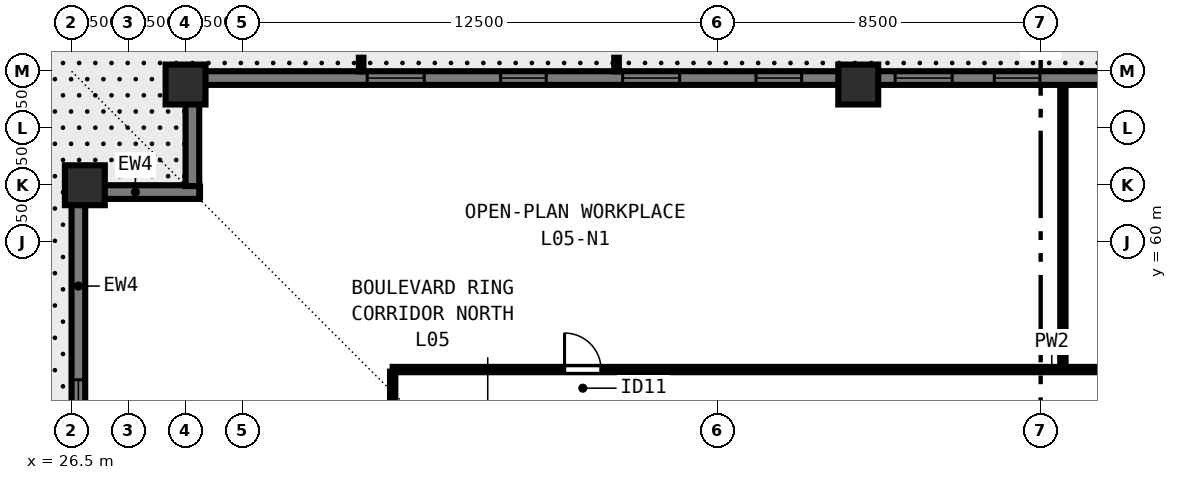
"""IFC4 building model, lengths in metres.
Left out: names, types, materials, properties, quantities, classifications, styles, units other than length and angle.
Written with IfcOpenShell. Run it as: python <this file> out.ifc"""

import sys

from ifc_helpers import new_model, si_unit, direction, frame, frame_2d, origin, origin_2d, place, context, subcontext, project, spatial, rectangle, extrude, element, fill, save


model = new_model("IFC4")
c1 = context("Model", 3, precision=1e-05, world=origin(), true_north=direction((0.0, 1.0)))
c2 = subcontext(c1, "Body", "Model", "MODEL_VIEW")
j1 = project(units=[si_unit("LENGTHUNIT", "METRE"), si_unit("PLANEANGLEUNIT", "RADIAN")], contexts=[c1])
p1 = place(None, origin())
s1 = spatial("IfcSite", under=j1, at=p1, CompositionType="ELEMENT")
p2 = place(p1, origin())
s2 = spatial("IfcBuilding", under=s1, at=p2, CompositionType="ELEMENT")
p3 = place(p2, frame((0.0, 0.0, 23.5)))
s3 = spatial("IfcBuildingStorey", under=s2, at=p3, CompositionType="ELEMENT", Elevation=23.5)
for number, where, z_axis, x_axis in (
    (1, (47.2, 64.15, 0.0), (0.0, 0.0, 1.0), (1.0, 0.0, 0.0)),
    (2, (29.5, 64.15, 0.0), (0.0, 0.0, 1.0), (1.0, 0.0, 0.0)),
    (3, (26.85, 61.5, 0.0), (0.0, 0.0, 1.0), (0.0, 1.0, 0.0)),
):
    element("IfcColumn", number, at=place(p3, frame(where, z_axis=z_axis, x_axis=x_axis)), inside=s3, PredefinedType="COLUMN", context=c2, shape_type="SweptSolid", body=[
        extrude(rectangle(XDim=1.05, YDim=1.05, at=origin_2d()), origin(), (0.0, 0.0, 1.0), 3.5),
    ])
p4 = place(p3, frame((26.68, 16.5, 0.0), z_axis=(0.0, 0.0, 1.0), x_axis=(0.0, 1.0, 0.0)))
e4 = element("IfcWall", 4, at=p4, inside=s3, PredefinedType="SOLIDWALL", context=c2, shape_type="SweptSolid", body=[
    extrude(rectangle(XDim=44.662, YDim=0.36, at=frame_2d((22.331, 0.0))), origin(), (0.0, 0.0, 1.0), 3.28),
])
p5 = place(p4, frame((4.78, 0.0, 0.8)))
e5 = element("IfcOpeningElement", 5, at=p5, cuts=e4, PredefinedType="OPENING", context=c2, shape_type="SweptSolid", body=[
    extrude(rectangle(XDim=1.5, YDim=1.544, at=frame_2d((0.75, 0.772))), frame((0.0, 0.19, 0.0), z_axis=(0.0, -1.0, 0.0), x_axis=(1.0, 0.0, 0.0)), (0.0, 0.0, 1.0), 0.38),
])
p6 = place(p4, frame((8.29, 0.0, 0.8)))
e6 = element("IfcOpeningElement", 6, at=p6, cuts=e4, PredefinedType="OPENING", context=c2, shape_type="SweptSolid", body=[
    extrude(rectangle(XDim=1.2, YDim=1.544, at=frame_2d((0.6, 0.772))), frame((0.0, 0.19, 0.0), z_axis=(0.0, -1.0, 0.0), x_axis=(1.0, 0.0, 0.0)), (0.0, 0.0, 1.0), 0.38),
])
p7 = place(p4, frame((11.5, 0.0, 0.8)))
e7 = element("IfcOpeningElement", 7, at=p7, cuts=e4, PredefinedType="OPENING", context=c2, shape_type="SweptSolid", body=[
    extrude(rectangle(XDim=1.5, YDim=1.544, at=frame_2d((0.75, 0.772))), frame((0.0, 0.19, 0.0), z_axis=(0.0, -1.0, 0.0), x_axis=(1.0, 0.0, 0.0)), (0.0, 0.0, 1.0), 0.38),
])
p8 = place(p4, frame((14.561, 0.0, 0.8)))
e8 = element("IfcOpeningElement", 8, at=p8, cuts=e4, PredefinedType="OPENING", context=c2, shape_type="SweptSolid", body=[
    extrude(rectangle(XDim=1.2, YDim=1.544, at=frame_2d((0.6, 0.772))), frame((0.0, 0.19, 0.0), z_axis=(0.0, -1.0, 0.0), x_axis=(1.0, 0.0, 0.0)), (0.0, 0.0, 1.0), 0.38),
])
p9 = place(p4, frame((18.671, 0.0, 0.8)))
e9 = element("IfcOpeningElement", 9, at=p9, cuts=e4, PredefinedType="OPENING", context=c2, shape_type="SweptSolid", body=[
    extrude(rectangle(XDim=1.5, YDim=1.544, at=frame_2d((0.75, 0.772))), frame((0.0, 0.19, 0.0), z_axis=(0.0, -1.0, 0.0), x_axis=(1.0, 0.0, 0.0)), (0.0, 0.0, 1.0), 0.38),
])
p10 = place(p4, frame((21.731, 0.0, 0.8)))
e10 = element("IfcOpeningElement", 10, at=p10, cuts=e4, PredefinedType="OPENING", context=c2, shape_type="SweptSolid", body=[
    extrude(rectangle(XDim=1.2, YDim=1.544, at=frame_2d((0.6, 0.772))), frame((0.0, 0.19, 0.0), z_axis=(0.0, -1.0, 0.0), x_axis=(1.0, 0.0, 0.0)), (0.0, 0.0, 1.0), 0.38),
])
p11 = place(p4, frame((24.941, 0.0, 0.8)))
e11 = element("IfcOpeningElement", 11, at=p11, cuts=e4, PredefinedType="OPENING", context=c2, shape_type="SweptSolid", body=[
    extrude(rectangle(XDim=1.5, YDim=1.544, at=frame_2d((0.75, 0.772))), frame((0.0, 0.19, 0.0), z_axis=(0.0, -1.0, 0.0), x_axis=(1.0, 0.0, 0.0)), (0.0, 0.0, 1.0), 0.38),
])
p12 = place(p4, frame((29.302, 0.0, 0.8)))
e12 = element("IfcOpeningElement", 12, at=p12, cuts=e4, PredefinedType="OPENING", context=c2, shape_type="SweptSolid", body=[
    extrude(rectangle(XDim=1.2, YDim=1.544, at=frame_2d((0.6, 0.772))), frame((0.0, 0.19, 0.0), z_axis=(0.0, -1.0, 0.0), x_axis=(1.0, 0.0, 0.0)), (0.0, 0.0, 1.0), 0.38),
])
p13 = place(p4, frame((31.662, 0.0, 0.8)))
e13 = element("IfcOpeningElement", 13, at=p13, cuts=e4, PredefinedType="OPENING", context=c2, shape_type="SweptSolid", body=[
    extrude(rectangle(XDim=1.5, YDim=1.544, at=frame_2d((0.75, 0.772))), frame((0.0, 0.19, 0.0), z_axis=(0.0, -1.0, 0.0), x_axis=(1.0, 0.0, 0.0)), (0.0, 0.0, 1.0), 0.38),
])
p14 = place(p4, frame((35.172, 0.0, 0.8)))
e14 = element("IfcOpeningElement", 14, at=p14, cuts=e4, PredefinedType="OPENING", context=c2, shape_type="SweptSolid", body=[
    extrude(rectangle(XDim=1.2, YDim=1.544, at=frame_2d((0.6, 0.772))), frame((0.0, 0.19, 0.0), z_axis=(0.0, -1.0, 0.0), x_axis=(1.0, 0.0, 0.0)), (0.0, 0.0, 1.0), 0.38),
])
p15 = place(p4, frame((38.382, 0.0, 0.8)))
e15 = element("IfcOpeningElement", 15, at=p15, cuts=e4, PredefinedType="OPENING", context=c2, shape_type="SweptSolid", body=[
    extrude(rectangle(XDim=1.5, YDim=1.544, at=frame_2d((0.75, 0.772))), frame((0.0, 0.19, 0.0), z_axis=(0.0, -1.0, 0.0), x_axis=(1.0, 0.0, 0.0)), (0.0, 0.0, 1.0), 0.38),
])
p16 = place(p4, frame((3.35, 0.0, 0.0)))
e16 = element("IfcOpeningElement", 16, at=p16, cuts=e4, PredefinedType="OPENING", context=c2, shape_type="SweptSolid", body=[
    extrude(rectangle(XDim=1.15, YDim=2.15, at=frame_2d((0.575, 1.075))), frame((0.0, 0.19, 0.0), z_axis=(0.0, -1.0, 0.0), x_axis=(1.0, 0.0, 0.0)), (0.0, 0.0, 1.0), 0.38),
])
p17 = place(p3, frame((26.5, 61.32, 0.0), z_axis=(0.0, 0.0, 1.0), x_axis=(1.0, 0.0, 0.0)))
e17 = element("IfcWall", 17, at=p17, inside=s3, PredefinedType="SOLIDWALL", context=c2, shape_type="SweptSolid", body=[
    extrude(rectangle(XDim=3.36, YDim=0.36, at=frame_2d((1.68, 0.0))), origin(), (0.0, 0.0, 1.0), 3.28),
])
p18 = place(p3, frame((29.68, 61.478, 0.0), z_axis=(0.0, 0.0, 1.0), x_axis=(0.0, 1.0, 0.0)))
e18 = element("IfcWall", 18, at=p18, inside=s3, PredefinedType="SOLIDWALL", context=c2, shape_type="SweptSolid", body=[
    extrude(rectangle(XDim=2.684, YDim=0.36, at=frame_2d((1.342, 0.0))), origin(), (0.0, 0.0, 1.0), 3.28),
])
p19 = place(p3, frame((29.5, 64.32, 0.0), z_axis=(0.0, 0.0, 1.0), x_axis=(1.0, 0.0, 0.0)))
e19 = element("IfcWall", 19, at=p19, inside=s3, PredefinedType="SOLIDWALL", context=c2, shape_type="SweptSolid", body=[
    extrude(rectangle(XDim=44.662, YDim=0.36, at=frame_2d((22.331, 0.0))), origin(), (0.0, 0.0, 1.0), 3.28),
])
p20 = place(p19, frame((4.78, 0.0, 0.8)))
e20 = element("IfcOpeningElement", 20, at=p20, cuts=e19, PredefinedType="OPENING", context=c2, shape_type="SweptSolid", body=[
    extrude(rectangle(XDim=1.5, YDim=1.544, at=frame_2d((0.75, 0.772))), frame((0.0, 0.19, 0.0), z_axis=(0.0, -1.0, 0.0), x_axis=(1.0, 0.0, 0.0)), (0.0, 0.0, 1.0), 0.38),
])
p21 = place(p19, frame((8.29, 0.0, 0.8)))
e21 = element("IfcOpeningElement", 21, at=p21, cuts=e19, PredefinedType="OPENING", context=c2, shape_type="SweptSolid", body=[
    extrude(rectangle(XDim=1.2, YDim=1.544, at=frame_2d((0.6, 0.772))), frame((0.0, 0.19, 0.0), z_axis=(0.0, -1.0, 0.0), x_axis=(1.0, 0.0, 0.0)), (0.0, 0.0, 1.0), 0.38),
])
p22 = place(p19, frame((11.5, 0.0, 0.8)))
e22 = element("IfcOpeningElement", 22, at=p22, cuts=e19, PredefinedType="OPENING", context=c2, shape_type="SweptSolid", body=[
    extrude(rectangle(XDim=1.5, YDim=1.544, at=frame_2d((0.75, 0.772))), frame((0.0, 0.19, 0.0), z_axis=(0.0, -1.0, 0.0), x_axis=(1.0, 0.0, 0.0)), (0.0, 0.0, 1.0), 0.38),
])
p23 = place(p19, frame((15.01, 0.0, 0.8)))
e23 = element("IfcOpeningElement", 23, at=p23, cuts=e19, PredefinedType="OPENING", context=c2, shape_type="SweptSolid", body=[
    extrude(rectangle(XDim=1.2, YDim=1.544, at=frame_2d((0.6, 0.772))), frame((0.0, 0.19, 0.0), z_axis=(0.0, -1.0, 0.0), x_axis=(1.0, 0.0, 0.0)), (0.0, 0.0, 1.0), 0.38),
])
p24 = place(p19, frame((18.671, 0.0, 0.8)))
e24 = element("IfcOpeningElement", 24, at=p24, cuts=e19, PredefinedType="OPENING", context=c2, shape_type="SweptSolid", body=[
    extrude(rectangle(XDim=1.5, YDim=1.544, at=frame_2d((0.75, 0.772))), frame((0.0, 0.19, 0.0), z_axis=(0.0, -1.0, 0.0), x_axis=(1.0, 0.0, 0.0)), (0.0, 0.0, 1.0), 0.38),
])
p25 = place(p19, frame((21.281, 0.0, 0.8)))
e25 = element("IfcOpeningElement", 25, at=p25, cuts=e19, PredefinedType="OPENING", context=c2, shape_type="SweptSolid", body=[
    extrude(rectangle(XDim=1.2, YDim=1.544, at=frame_2d((0.6, 0.772))), frame((0.0, 0.19, 0.0), z_axis=(0.0, -1.0, 0.0), x_axis=(1.0, 0.0, 0.0)), (0.0, 0.0, 1.0), 0.38),
])
p26 = place(p19, frame((24.941, 0.0, 0.8)))
e26 = element("IfcOpeningElement", 26, at=p26, cuts=e19, PredefinedType="OPENING", context=c2, shape_type="SweptSolid", body=[
    extrude(rectangle(XDim=1.5, YDim=1.544, at=frame_2d((0.75, 0.772))), frame((0.0, 0.19, 0.0), z_axis=(0.0, -1.0, 0.0), x_axis=(1.0, 0.0, 0.0)), (0.0, 0.0, 1.0), 0.38),
])
p27 = place(p19, frame((28.451, 0.0, 0.8)))
e27 = element("IfcOpeningElement", 27, at=p27, cuts=e19, PredefinedType="OPENING", context=c2, shape_type="SweptSolid", body=[
    extrude(rectangle(XDim=1.2, YDim=1.544, at=frame_2d((0.6, 0.772))), frame((0.0, 0.19, 0.0), z_axis=(0.0, -1.0, 0.0), x_axis=(1.0, 0.0, 0.0)), (0.0, 0.0, 1.0), 0.38),
])
p28 = place(p19, frame((31.662, 0.0, 0.8)))
e28 = element("IfcOpeningElement", 28, at=p28, cuts=e19, PredefinedType="OPENING", context=c2, shape_type="SweptSolid", body=[
    extrude(rectangle(XDim=1.5, YDim=1.544, at=frame_2d((0.75, 0.772))), frame((0.0, 0.19, 0.0), z_axis=(0.0, -1.0, 0.0), x_axis=(1.0, 0.0, 0.0)), (0.0, 0.0, 1.0), 0.38),
])
p29 = place(p19, frame((35.172, 0.0, 0.8)))
e29 = element("IfcOpeningElement", 29, at=p29, cuts=e19, PredefinedType="OPENING", context=c2, shape_type="SweptSolid", body=[
    extrude(rectangle(XDim=1.2, YDim=1.544, at=frame_2d((0.6, 0.772))), frame((0.0, 0.19, 0.0), z_axis=(0.0, -1.0, 0.0), x_axis=(1.0, 0.0, 0.0)), (0.0, 0.0, 1.0), 0.38),
])
p30 = place(p19, frame((38.382, 0.0, 0.8)))
e30 = element("IfcOpeningElement", 30, at=p30, cuts=e19, PredefinedType="OPENING", context=c2, shape_type="SweptSolid", body=[
    extrude(rectangle(XDim=1.5, YDim=1.544, at=frame_2d((0.75, 0.772))), frame((0.0, 0.19, 0.0), z_axis=(0.0, -1.0, 0.0), x_axis=(1.0, 0.0, 0.0)), (0.0, 0.0, 1.0), 0.38),
])
p31 = place(p3, frame((34.95, 56.65, 0.0), z_axis=(0.0, 0.0, 1.0), x_axis=(1.0, 0.0, 0.0)))
e31 = element("IfcWall", 31, at=p31, inside=s3, PredefinedType="PARTITIONING", context=c2, shape_type="SweptSolid", body=[
    extrude(rectangle(XDim=34.1, YDim=0.14, at=frame_2d((17.05, 0.0))), origin(), (0.0, 0.0, 1.0), 3.28),
])
p32 = place(p31, frame((4.522, 0.0, 0.0)))
e32 = element("IfcOpeningElement", 32, at=p32, cuts=e31, PredefinedType="OPENING", context=c2, shape_type="SweptSolid", body=[
    extrude(rectangle(XDim=0.96, YDim=2.12, at=frame_2d((0.48, 1.06))), frame((0.0, 0.08, 0.0), z_axis=(0.0, -1.0, 0.0), x_axis=(1.0, 0.0, 0.0)), (0.0, 0.0, 1.0), 0.16),
])
p33 = place(p31, frame((29.202, 0.0, 0.0)))
e33 = element("IfcOpeningElement", 33, at=p33, cuts=e31, PredefinedType="OPENING", context=c2, shape_type="SweptSolid", body=[
    extrude(rectangle(XDim=0.96, YDim=2.12, at=frame_2d((0.48, 1.06))), frame((0.0, 0.08, 0.0), z_axis=(0.0, -1.0, 0.0), x_axis=(1.0, 0.0, 0.0)), (0.0, 0.0, 1.0), 0.16),
])
p34 = place(p3, frame((34.95, 21.405, 0.0), z_axis=(0.0, 0.0, 1.0), x_axis=(0.0, 1.0, 0.0)))
e34 = element("IfcWall", 34, at=p34, inside=s3, PredefinedType="PARTITIONING", context=c2, shape_type="SweptSolid", body=[
    extrude(rectangle(XDim=35.19, YDim=0.14, at=frame_2d((17.595, 0.0))), origin(), (0.0, 0.0, 1.0), 3.28),
])
p35 = place(p34, frame((5.21, 0.0, 0.0)))
e35 = element("IfcOpeningElement", 35, at=p35, cuts=e34, PredefinedType="OPENING", context=c2, shape_type="SweptSolid", body=[
    extrude(rectangle(XDim=0.96, YDim=2.12, at=frame_2d((0.48, 1.06))), frame((0.0, 0.08, 0.0), z_axis=(0.0, -1.0, 0.0), x_axis=(1.0, 0.0, 0.0)), (0.0, 0.0, 1.0), 0.16),
])
p36 = place(p34, frame((17.052, 0.0, 0.0)))
e36 = element("IfcOpeningElement", 36, at=p36, cuts=e34, PredefinedType="OPENING", context=c2, shape_type="SweptSolid", body=[
    extrude(rectangle(XDim=0.96, YDim=2.12, at=frame_2d((0.48, 1.06))), frame((0.0, 0.08, 0.0), z_axis=(0.0, -1.0, 0.0), x_axis=(1.0, 0.0, 0.0)), (0.0, 0.0, 1.0), 0.16),
])
p37 = place(p34, frame((28.957, 0.0, 0.0)))
e37 = element("IfcOpeningElement", 37, at=p37, cuts=e34, PredefinedType="OPENING", context=c2, shape_type="SweptSolid", body=[
    extrude(rectangle(XDim=0.96, YDim=2.12, at=frame_2d((0.48, 1.06))), frame((0.0, 0.08, 0.0), z_axis=(0.0, -1.0, 0.0), x_axis=(1.0, 0.0, 0.0)), (0.0, 0.0, 1.0), 0.16),
])
p38 = place(p3, frame((52.585, 56.75, 0.0), z_axis=(0.0, 0.0, 1.0), x_axis=(0.0, 1.0, 0.0)))
e38 = element("IfcWall", 38, at=p38, inside=s3, PredefinedType="PARTITIONING", context=c2, shape_type="SweptSolid", body=[
    extrude(rectangle(XDim=7.33, YDim=0.14, at=frame_2d((3.665, 0.0))), origin(), (0.0, 0.0, 1.0), 2.849),
])
p39 = place(p15, origin())
e39 = element("IfcWindow", 39, at=p39, inside=s3, PartitioningType="SINGLE_PANEL", PredefinedType="WINDOW", context=c2, shape_type="SweptSolid", body=[
    extrude(rectangle(XDim=1.5, YDim=1.544, at=frame_2d((0.75, 0.772))), frame((0.0, -0.05, 0.0), z_axis=(0.0, -1.0, 0.0), x_axis=(1.0, 0.0, 0.0)), (0.0, 0.0, 1.0), 0.06),
])
fill(e15, e39)
p40 = place(p20, origin())
e40 = element("IfcWindow", 40, at=p40, inside=s3, PartitioningType="SINGLE_PANEL", PredefinedType="WINDOW", context=c2, shape_type="SweptSolid", body=[
    extrude(rectangle(XDim=1.5, YDim=1.544, at=frame_2d((0.75, 0.772))), frame((0.0, -0.05, 0.0), z_axis=(0.0, -1.0, 0.0), x_axis=(1.0, 0.0, 0.0)), (0.0, 0.0, 1.0), 0.06),
])
fill(e20, e40)
p41 = place(p21, origin())
e41 = element("IfcWindow", 41, at=p41, inside=s3, PartitioningType="SINGLE_PANEL", PredefinedType="WINDOW", context=c2, shape_type="SweptSolid", body=[
    extrude(rectangle(XDim=1.2, YDim=1.544, at=frame_2d((0.6, 0.772))), frame((0.0, -0.05, 0.0), z_axis=(0.0, -1.0, 0.0), x_axis=(1.0, 0.0, 0.0)), (0.0, 0.0, 1.0), 0.06),
])
fill(e21, e41)
p42 = place(p22, origin())
e42 = element("IfcWindow", 42, at=p42, inside=s3, PartitioningType="SINGLE_PANEL", PredefinedType="WINDOW", context=c2, shape_type="SweptSolid", body=[
    extrude(rectangle(XDim=1.5, YDim=1.544, at=frame_2d((0.75, 0.772))), frame((0.0, -0.05, 0.0), z_axis=(0.0, -1.0, 0.0), x_axis=(1.0, 0.0, 0.0)), (0.0, 0.0, 1.0), 0.06),
])
fill(e22, e42)
p43 = place(p23, origin())
e43 = element("IfcWindow", 43, at=p43, inside=s3, PartitioningType="SINGLE_PANEL", PredefinedType="WINDOW", context=c2, shape_type="SweptSolid", body=[
    extrude(rectangle(XDim=1.2, YDim=1.544, at=frame_2d((0.6, 0.772))), frame((0.0, -0.05, 0.0), z_axis=(0.0, -1.0, 0.0), x_axis=(1.0, 0.0, 0.0)), (0.0, 0.0, 1.0), 0.06),
])
fill(e23, e43)
p44 = place(p24, origin())
e44 = element("IfcWindow", 44, at=p44, inside=s3, PartitioningType="SINGLE_PANEL", PredefinedType="WINDOW", context=c2, shape_type="SweptSolid", body=[
    extrude(rectangle(XDim=1.5, YDim=1.544, at=frame_2d((0.75, 0.772))), frame((0.0, -0.05, 0.0), z_axis=(0.0, -1.0, 0.0), x_axis=(1.0, 0.0, 0.0)), (0.0, 0.0, 1.0), 0.06),
])
fill(e24, e44)
p45 = place(p25, origin())
e45 = element("IfcWindow", 45, at=p45, inside=s3, PartitioningType="SINGLE_PANEL", PredefinedType="WINDOW", context=c2, shape_type="SweptSolid", body=[
    extrude(rectangle(XDim=1.2, YDim=1.544, at=frame_2d((0.6, 0.772))), frame((0.0, -0.05, 0.0), z_axis=(0.0, -1.0, 0.0), x_axis=(1.0, 0.0, 0.0)), (0.0, 0.0, 1.0), 0.06),
])
fill(e25, e45)
p46 = place(p32, origin())
e46 = element("IfcDoor", 46, at=p46, inside=s3, OperationType="SINGLE_SWING_LEFT", PredefinedType="DOOR", context=c2, shape_type="SweptSolid", body=[
    extrude(rectangle(XDim=0.96, YDim=2.12, at=frame_2d((0.48, 1.06))), frame((0.0, 0.025, 0.0), z_axis=(0.0, -1.0, 0.0), x_axis=(1.0, 0.0, 0.0)), (0.0, 0.0, 1.0), 0.05),
])
fill(e32, e46)
save(model, sys.argv[1])
